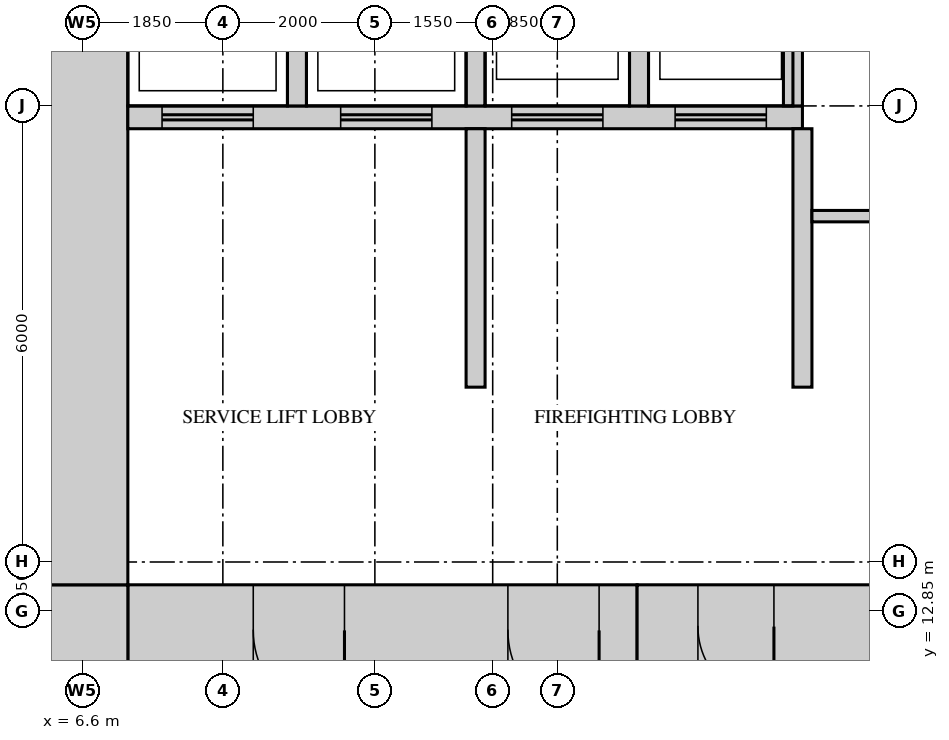
"""IFC4 building model, lengths in metres.
Left out: names, types, materials, properties, quantities, classifications, styles, units other than length and angle.
Written with IfcOpenShell. Run it as: python <this file> out.ifc"""

import sys

from ifc_helpers import new_model, si_unit, direction, frame, frame_2d, origin, place, context, subcontext, project, spatial, rectangle, extrude, source, transform, mapped, element, fill, save


model = new_model("IFC4")
c1 = context("Model", 3, precision=1e-05, world=origin(), true_north=direction((0.0, 1.0)))
c2 = subcontext(c1, "Body", "Model", "MODEL_VIEW")
j1 = project(units=[si_unit("LENGTHUNIT", "METRE"), si_unit("PLANEANGLEUNIT", "RADIAN")], contexts=[c1])
p1 = place(None, origin())
s1 = spatial("IfcSite", under=j1, at=p1, CompositionType="ELEMENT")
p2 = place(p1, origin())
s2 = spatial("IfcBuilding", under=s1, at=p2, CompositionType="ELEMENT")
p3 = place(p2, frame((0.0, 0.0, 87.0)))
s3 = spatial("IfcBuildingStorey", under=s2, at=p3, CompositionType="ELEMENT", Elevation=87.0)
m1 = source(origin(), c2, "Body", "SweptSolid", [
    extrude(rectangle(XDim=6.7, YDim=1.2, at=frame_2d((3.35, 0.0))), origin(), (0.0, 0.0, 1.0), 4.2),
])
p4 = place(p3, frame((7.2, 12.6, 0.0), z_axis=(0.0, 0.0, 1.0), x_axis=(1.0, 0.0, 0.0)))
e1 = element("IfcWall", 1, at=p4, inside=s3, PredefinedType="SHEAR", context=c2, shape_type="MappedRepresentation", body=[
    mapped(m1, transform((0.0, 0.0, 0.0))),
])
m2 = source(origin(), c2, "Body", "SweptSolid", [
    extrude(rectangle(XDim=1.2, YDim=2.1, at=frame_2d((0.6, 1.05))), frame((0.0, 0.61, 0.0), z_axis=(0.0, -1.0, 0.0), x_axis=(1.0, 0.0, 0.0)), (0.0, 0.0, 1.0), 1.22),
])
p5 = place(p4, frame((5.0, 0.0, 0.0)))
e2 = element("IfcOpeningElement", 2, at=p5, cuts=e1, PredefinedType="OPENING", context=c2, shape_type="MappedRepresentation", body=[
    mapped(m2, transform((0.0, 0.0, 0.0))),
])
p6 = place(p4, frame((1.65, 0.0, 0.0)))
e3 = element("IfcOpeningElement", 3, at=p6, cuts=e1, PredefinedType="OPENING", context=c2, shape_type="MappedRepresentation", body=[
    mapped(m2, transform((0.0, 0.0, 0.0))),
])
m3 = source(origin(), c2, "Body", "SweptSolid", [
    extrude(rectangle(XDim=7.2, YDim=1.1, at=frame_2d((3.6, 0.0))), origin(), (0.0, 0.0, 1.0), 4.2),
])
p7 = place(p3, frame((13.9, 12.65, 0.0), z_axis=(0.0, 0.0, 1.0), x_axis=(1.0, 0.0, 0.0)))
e4 = element("IfcWall", 4, at=p7, inside=s3, PredefinedType="SHEAR", context=c2, shape_type="MappedRepresentation", body=[
    mapped(m3, transform((0.0, 0.0, 0.0))),
])
m4 = source(origin(), c2, "Body", "SweptSolid", [
    extrude(rectangle(XDim=1.0, YDim=2.1, at=frame_2d((0.5, 1.05))), frame((0.0, 0.56, 0.0), z_axis=(0.0, -1.0, 0.0), x_axis=(1.0, 0.0, 0.0)), (0.0, 0.0, 1.0), 1.12),
])
p8 = place(p7, frame((0.8, 0.0, 0.0)))
e5 = element("IfcOpeningElement", 5, at=p8, cuts=e4, PredefinedType="OPENING", context=c2, shape_type="MappedRepresentation", body=[
    mapped(m4, transform((0.0, 0.0, 0.0))),
])
m5 = source(origin(), c2, "Body", "SweptSolid", [
    extrude(rectangle(XDim=1.2, YDim=1.2, at=frame_2d((0.6, 0.0))), origin(), (0.0, 0.0, 1.0), 4.2),
])
p9 = place(p3, frame((6.0, 12.6, 0.0), z_axis=(0.0, 0.0, 1.0), x_axis=(1.0, 0.0, 0.0)))
e6 = element("IfcWall", 6, at=p9, inside=s3, PredefinedType="SHEAR", context=c2, shape_type="MappedRepresentation", body=[
    mapped(m5, transform((0.0, 0.0, 0.0))),
])
m6 = source(origin(), c2, "Body", "SweptSolid", [
    extrude(rectangle(XDim=27.6, YDim=1.2, at=frame_2d((13.8, 0.0))), origin(), (0.0, 0.0, 1.0), 4.2),
])
p10 = place(p3, frame((6.6, 13.2, 0.0), z_axis=(0.0, 0.0, 1.0), x_axis=(0.0, 1.0, 0.0)))
e7 = element("IfcWall", 7, at=p10, inside=s3, PredefinedType="SHEAR", context=c2, shape_type="MappedRepresentation", body=[
    mapped(m6, transform((0.0, 0.0, 0.0))),
])
m7 = source(origin(), c2, "Body", "SweptSolid", [
    extrude(rectangle(XDim=8.875, YDim=0.3, at=frame_2d((4.438, 0.0))), origin(), (0.0, 0.0, 1.0), 4.2),
])
p11 = place(p3, frame((7.2, 19.35, 0.0), z_axis=(0.0, 0.0, 1.0), x_axis=(1.0, 0.0, 0.0)))
e8 = element("IfcWall", 8, at=p11, inside=s3, PredefinedType="STANDARD", context=c2, shape_type="MappedRepresentation", body=[
    mapped(m7, transform((0.0, 0.0, 0.0))),
])
m8 = source(origin(), c2, "Body", "SweptSolid", [
    extrude(rectangle(XDim=1.2, YDim=2.1, at=frame_2d((0.6, 1.05))), frame((0.0, 0.16, 0.0), z_axis=(0.0, -1.0, 0.0), x_axis=(1.0, 0.0, 0.0)), (0.0, 0.0, 1.0), 0.32),
])
p12 = place(p11, frame((0.45, 0.0, 0.0)))
e9 = element("IfcOpeningElement", 9, at=p12, cuts=e8, PredefinedType="OPENING", context=c2, shape_type="MappedRepresentation", body=[
    mapped(m8, transform((0.0, 0.0, 0.0))),
])
p13 = place(p11, frame((2.8, 0.0, 0.0)))
e10 = element("IfcOpeningElement", 10, at=p13, cuts=e8, PredefinedType="OPENING", context=c2, shape_type="MappedRepresentation", body=[
    mapped(m8, transform((0.0, 0.0, 0.0))),
])
p14 = place(p11, frame((5.05, 0.0, 0.0)))
e11 = element("IfcOpeningElement", 11, at=p14, cuts=e8, PredefinedType="OPENING", context=c2, shape_type="MappedRepresentation", body=[
    mapped(m8, transform((0.0, 0.0, 0.0))),
])
p15 = place(p11, frame((7.2, 0.0, 0.0)))
e12 = element("IfcOpeningElement", 12, at=p15, cuts=e8, PredefinedType="OPENING", context=c2, shape_type="MappedRepresentation", body=[
    mapped(m8, transform((0.0, 0.0, 0.0))),
])
m9 = source(origin(), c2, "Body", "SweptSolid", [
    extrude(rectangle(XDim=3.1, YDim=0.25, at=frame_2d((1.55, 0.0))), origin(), (0.0, 0.0, 1.0), 4.2),
])
for number, where, z_axis, x_axis in (
    (13, (9.425, 19.5, 0.0), (0.0, 0.0, 1.0), (0.0, 1.0, 0.0)),
    (14, (11.775, 19.5, 0.0), (0.0, 0.0, 1.0), (0.0, 1.0, 0.0)),
    (15, (13.925, 19.5, 0.0), (0.0, 0.0, 1.0), (0.0, 1.0, 0.0)),
    (16, (15.95, 19.5, 0.0), (0.0, 0.0, 1.0), (0.0, 1.0, 0.0)),
):
    element("IfcWall", number, at=place(p3, frame(where, z_axis=z_axis, x_axis=x_axis)), inside=s3, PredefinedType="STANDARD", context=c2, shape_type="MappedRepresentation", body=[
        mapped(m9, transform((0.0, 0.0, 0.0))),
    ])
m10 = source(origin(), c2, "Body", "SweptSolid", [
    extrude(rectangle(XDim=3.4, YDim=0.25, at=frame_2d((1.7, 0.0))), origin(), (0.0, 0.0, 1.0), 4.2),
])
for number, where, z_axis, x_axis in (
    (17, (16.075, 15.8, 0.0), (0.0, 0.0, 1.0), (0.0, 1.0, 0.0)),
    (18, (11.775, 15.8, 0.0), (0.0, 0.0, 1.0), (0.0, 1.0, 0.0)),
):
    element("IfcWall", number, at=place(p3, frame(where, z_axis=z_axis, x_axis=x_axis)), inside=s3, PredefinedType="STANDARD", context=c2, shape_type="MappedRepresentation", body=[
        mapped(m10, transform((0.0, 0.0, 0.0))),
    ])
m11 = source(origin(), c2, "Body", "SweptSolid", [
    extrude(rectangle(XDim=6.6, YDim=0.15, at=frame_2d((3.3, 0.0))), origin(), (0.0, 0.0, 1.0), 4.3),
])
p16 = place(p3, frame((16.2, 18.05, 0.0), z_axis=(0.0, 0.0, 1.0), x_axis=(1.0, 0.0, 0.0)))
e19 = element("IfcWall", 19, at=p16, inside=s3, PredefinedType="PARTITIONING", context=c2, shape_type="MappedRepresentation", body=[
    mapped(m11, transform((0.0, 0.0, 0.0))),
])
m12 = source(origin(), c2, "Body", "SweptSolid", [
    extrude(rectangle(XDim=1.2, YDim=2.1, at=frame_2d((0.6, 1.05))), frame((0.0, 0.55, 0.0), z_axis=(0.0, -1.0, 0.0), x_axis=(1.0, 0.0, 0.0)), (0.0, 0.0, 1.0), 1.1),
])
p17 = place(p5, origin())
e20 = element("IfcDoor", 20, at=p17, inside=s3, OperationType="SINGLE_SWING_RIGHT", PredefinedType="DOOR", context=c2, shape_type="MappedRepresentation", body=[
    mapped(m12, transform((0.0, 0.0, 0.0))),
])
fill(e2, e20)
p18 = place(p6, origin())
e21 = element("IfcDoor", 21, at=p18, inside=s3, OperationType="SINGLE_SWING_RIGHT", PredefinedType="DOOR", context=c2, shape_type="MappedRepresentation", body=[
    mapped(m12, transform((0.0, 0.0, 0.0))),
])
fill(e3, e21)
m13 = source(origin(), c2, "Body", "SweptSolid", [
    extrude(rectangle(XDim=1.0, YDim=2.1, at=frame_2d((0.5, 1.05))), frame((0.0, 0.5, 0.0), z_axis=(0.0, -1.0, 0.0), x_axis=(1.0, 0.0, 0.0)), (0.0, 0.0, 1.0), 1.0),
])
p19 = place(p8, origin())
e22 = element("IfcDoor", 22, at=p19, inside=s3, OperationType="SINGLE_SWING_RIGHT", PredefinedType="DOOR", context=c2, shape_type="MappedRepresentation", body=[
    mapped(m13, transform((0.0, 0.0, 0.0))),
])
fill(e5, e22)
m14 = source(origin(), c2, "Body", "SweptSolid", [
    extrude(rectangle(XDim=1.2, YDim=2.1, at=frame_2d((0.6, 1.05))), frame((0.0, 0.025, 0.0), z_axis=(0.0, -1.0, 0.0), x_axis=(1.0, 0.0, 0.0)), (0.0, 0.0, 1.0), 0.05),
])
p20 = place(p12, origin())
e23 = element("IfcDoor", 23, at=p20, inside=s3, OperationType="DOUBLE_DOOR_SLIDING", PredefinedType="DOOR", context=c2, shape_type="MappedRepresentation", body=[
    mapped(m14, transform((0.0, 0.0, 0.0))),
])
fill(e9, e23)
p21 = place(p13, origin())
e24 = element("IfcDoor", 24, at=p21, inside=s3, OperationType="DOUBLE_DOOR_SLIDING", PredefinedType="DOOR", context=c2, shape_type="MappedRepresentation", body=[
    mapped(m14, transform((0.0, 0.0, 0.0))),
])
fill(e10, e24)
p22 = place(p14, origin())
e25 = element("IfcDoor", 25, at=p22, inside=s3, OperationType="DOUBLE_DOOR_SLIDING", PredefinedType="DOOR", context=c2, shape_type="MappedRepresentation", body=[
    mapped(m14, transform((0.0, 0.0, 0.0))),
])
fill(e11, e25)
p23 = place(p15, origin())
e26 = element("IfcDoor", 26, at=p23, inside=s3, OperationType="DOUBLE_DOOR_SLIDING", PredefinedType="DOOR", context=c2, shape_type="MappedRepresentation", body=[
    mapped(m14, transform((0.0, 0.0, 0.0))),
])
fill(e12, e26)
save(model, sys.argv[1])
